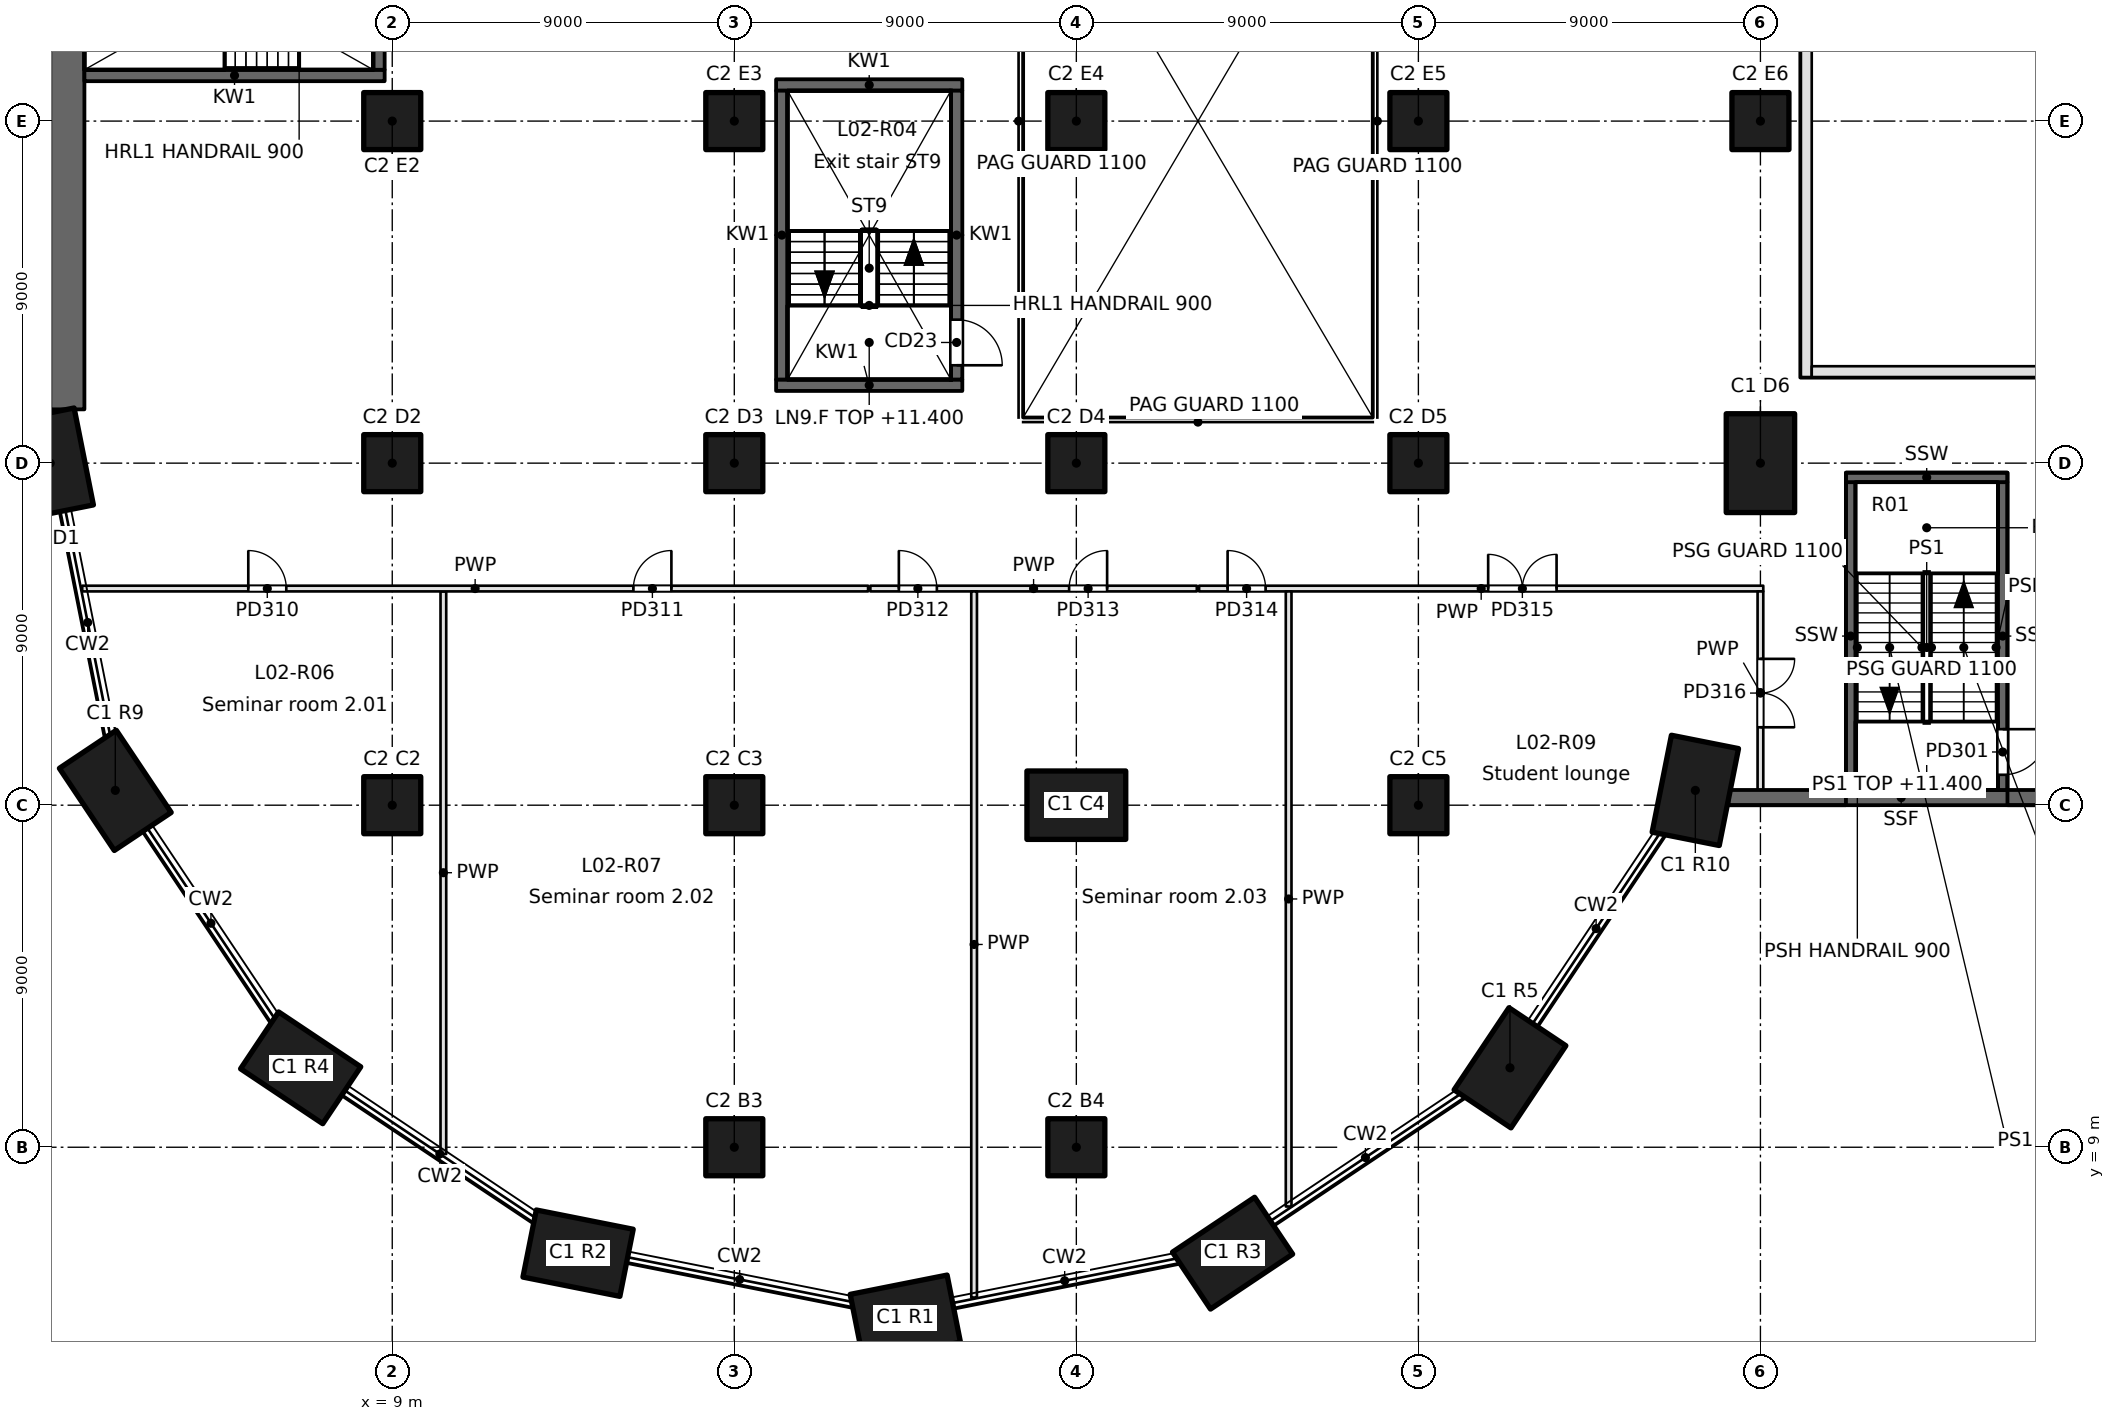
"""IFC4 building model, lengths in metres.
Left out: names, types, materials, properties, quantities, classifications, styles, units other than length and angle.
Written with IfcOpenShell. Run it as: python <this file> out.ifc"""

import sys

from ifc_helpers import new_model, si_unit, direction, frame, frame_2d, origin, origin_2d, place, context, subcontext, project, spatial, rectangle, extrude, element, fill, save


model = new_model("IFC4")
c1 = context("Model", 3, precision=1e-05, world=origin(), true_north=direction((0.0, 1.0)))
c2 = subcontext(c1, "Body", "Model", "MODEL_VIEW")
j1 = project(units=[si_unit("LENGTHUNIT", "METRE"), si_unit("PLANEANGLEUNIT", "RADIAN")], contexts=[c1])
p1 = place(None, origin())
s1 = spatial("IfcSite", under=j1, at=p1, CompositionType="ELEMENT")
p2 = place(p1, origin())
s2 = spatial("IfcBuilding", under=s1, at=p2, CompositionType="ELEMENT")
p3 = place(p2, frame((0.0, 0.0, 11.4)))
s3 = spatial("IfcBuildingStorey", under=s2, at=p3, CompositionType="ELEMENT", Elevation=11.4)
for number, where, z_axis, x_axis in (
    (1, (22.5, 4.5, 0.0), (0.0, 0.0, 1.0), (0.981, 0.195, 0.0)),
    (2, (13.89, 6.213, 0.0), (0.0, 0.0, 1.0), (-0.981, 0.195, 0.0)),
    (3, (31.11, 6.213, 0.0), (0.0, 0.0, 1.0), (0.831, 0.556, 0.0)),
    (4, (6.59, 11.09, 0.0), (0.0, 0.0, 1.0), (-0.831, 0.556, 0.0)),
    (5, (38.41, 11.09, 0.0), (0.0, 0.0, 1.0), (0.556, 0.831, 0.0)),
    (6, (1.713, 18.39, 0.0), (0.0, 0.0, 1.0), (-0.556, 0.831, 0.0)),
    (7, (43.287, 18.39, 0.0), (0.0, 0.0, 1.0), (0.195, 0.981, 0.0)),
    (8, (0.0, 27.0, 0.0), (0.0, 0.0, 1.0), (-0.195, 0.981, 0.0)),
    (9, (45.0, 27.0, 0.0), (0.0, 0.0, 1.0), (0.0, 1.0, 0.0)),
):
    element("IfcColumn", number, at=place(p3, frame(where, z_axis=z_axis, x_axis=x_axis)), inside=s3, PredefinedType="COLUMN", context=c2, shape_type="SweptSolid", body=[
        extrude(rectangle(XDim=2.6, YDim=1.8, at=origin_2d()), origin(), (0.0, 0.0, 1.0), 5.4),
    ])
for number, where, z_axis, x_axis in (
    (10, (45.0, 36.0, 0.0), (0.0, 0.0, 1.0), (1.0, 0.0, 0.0)),
    (11, (9.0, 18.0, 0.0), (0.0, 0.0, 1.0), (1.0, 0.0, 0.0)),
    (12, (9.0, 27.0, 0.0), (0.0, 0.0, 1.0), (1.0, 0.0, 0.0)),
    (13, (9.0, 36.0, 0.0), (0.0, 0.0, 1.0), (1.0, 0.0, 0.0)),
    (14, (18.0, 18.0, 0.0), (0.0, 0.0, 1.0), (1.0, 0.0, 0.0)),
    (15, (18.0, 27.0, 0.0), (0.0, 0.0, 1.0), (1.0, 0.0, 0.0)),
    (16, (18.0, 36.0, 0.0), (0.0, 0.0, 1.0), (1.0, 0.0, 0.0)),
):
    element("IfcColumn", number, at=place(p3, frame(where, z_axis=z_axis, x_axis=x_axis)), inside=s3, PredefinedType="COLUMN", context=c2, shape_type="SweptSolid", body=[
        extrude(rectangle(XDim=1.5, YDim=1.5, at=origin_2d()), origin(), (0.0, 0.0, 1.0), 5.4),
    ])
p4 = place(p3, frame((27.0, 18.0, 0.0), z_axis=(0.0, 0.0, 1.0), x_axis=(1.0, 0.0, 0.0)))
e17 = element("IfcColumn", 17, at=p4, inside=s3, PredefinedType="COLUMN", context=c2, shape_type="SweptSolid", body=[
    extrude(rectangle(XDim=2.6, YDim=1.8, at=origin_2d()), origin(), (0.0, 0.0, 1.0), 5.4),
])
for number, where, z_axis, x_axis in (
    (18, (27.0, 27.0, 0.0), (0.0, 0.0, 1.0), (1.0, 0.0, 0.0)),
    (19, (27.0, 36.0, 0.0), (0.0, 0.0, 1.0), (1.0, 0.0, 0.0)),
    (20, (36.0, 18.0, 0.0), (0.0, 0.0, 1.0), (1.0, 0.0, 0.0)),
    (21, (36.0, 27.0, 0.0), (0.0, 0.0, 1.0), (1.0, 0.0, 0.0)),
    (22, (36.0, 36.0, 0.0), (0.0, 0.0, 1.0), (1.0, 0.0, 0.0)),
    (23, (18.0, 9.0, 0.0), (0.0, 0.0, 1.0), (1.0, 0.0, 0.0)),
    (24, (27.0, 9.0, 0.0), (0.0, 0.0, 1.0), (1.0, 0.0, 0.0)),
):
    element("IfcColumn", number, at=place(p3, frame(where, z_axis=z_axis, x_axis=x_axis)), inside=s3, PredefinedType="COLUMN", context=c2, shape_type="SweptSolid", body=[
        extrude(rectangle(XDim=1.5, YDim=1.5, at=origin_2d()), origin(), (0.0, 0.0, 1.0), 5.4),
    ])
p5 = place(p3, frame((0.45, 94.5, 0.0), z_axis=(0.0, 0.0, 1.0), x_axis=(0.0, -1.0, 0.0)))
e25 = element("IfcWall", 25, at=p5, inside=s3, PredefinedType="SHEAR", context=c2, shape_type="SweptSolid", body=[
    extrude(rectangle(XDim=66.085, YDim=0.9, at=frame_2d((33.042, 0.0))), origin(), (0.0, 0.0, 1.0), 5.4),
])
for number, where, z_axis, x_axis in (
    (26, (19.1, 29.05, -0.35), (0.0, 0.0, 1.0), (1.0, 0.0, 0.0)),
    (27, (19.1, 36.95, -0.35), (0.0, 0.0, 1.0), (1.0, 0.0, 0.0)),
):
    element("IfcWall", number, at=place(p3, frame(where, z_axis=z_axis, x_axis=x_axis)), inside=s3, PredefinedType="SOLIDWALL", context=c2, shape_type="SweptSolid", body=[
        extrude(rectangle(XDim=4.9, YDim=0.3, at=frame_2d((2.45, 0.0))), origin(), (0.0, 0.0, 1.0), 5.4),
    ])
p6 = place(p3, frame((0.9, 37.2, -0.35), z_axis=(0.0, 0.0, 1.0), x_axis=(1.0, 0.0, 0.0)))
e28 = element("IfcWall", 28, at=p6, inside=s3, PredefinedType="SOLIDWALL", context=c2, shape_type="SweptSolid", body=[
    extrude(rectangle(XDim=7.9, YDim=0.3, at=frame_2d((3.95, 0.0))), origin(), (0.0, 0.0, 1.0), 5.4),
])
p7 = place(p3, frame((8.65, 37.35, -0.35), z_axis=(0.0, 0.0, 1.0), x_axis=(0.0, 1.0, 0.0)))
e29 = element("IfcWall", 29, at=p7, inside=s3, PredefinedType="SOLIDWALL", context=c2, shape_type="SweptSolid", body=[
    extrude(rectangle(XDim=4.3, YDim=0.3, at=frame_2d((2.15, 0.0))), origin(), (0.0, 0.0, 1.0), 5.4),
])
p8 = place(p3, frame((19.25, 29.2, -0.35), z_axis=(0.0, 0.0, 1.0), x_axis=(0.0, 1.0, 0.0)))
e30 = element("IfcWall", 30, at=p8, inside=s3, PredefinedType="SOLIDWALL", context=c2, shape_type="SweptSolid", body=[
    extrude(rectangle(XDim=7.6, YDim=0.3, at=frame_2d((3.8, 0.0))), origin(), (0.0, 0.0, 1.0), 5.4),
])
p9 = place(p3, frame((23.85, 29.2, -0.35), z_axis=(0.0, 0.0, 1.0), x_axis=(0.0, 1.0, 0.0)))
e31 = element("IfcWall", 31, at=p9, inside=s3, PredefinedType="SOLIDWALL", context=c2, shape_type="SweptSolid", body=[
    extrude(rectangle(XDim=7.6, YDim=0.3, at=frame_2d((3.8, 0.0))), origin(), (0.0, 0.0, 1.0), 5.4),
])
p10 = place(p9, frame((0.375, 0.0, 0.35)))
e32 = element("IfcOpeningElement", 32, at=p10, cuts=e31, PredefinedType="OPENING", context=c2, shape_type="SweptSolid", body=[
    extrude(rectangle(XDim=1.2, YDim=2.1, at=frame_2d((0.6, 1.05))), frame((0.0, 0.15, 0.0), z_axis=(0.0, -1.0, 0.0), x_axis=(1.0, 0.0, 0.0)), (0.0, 0.0, 1.0), 0.3),
])
p11 = place(p3, frame((47.375, 18.4, 0.0), z_axis=(0.0, 0.0, 1.0), x_axis=(0.0, 1.0, 0.0)))
e33 = element("IfcWall", 33, at=p11, inside=s3, PredefinedType="SOLIDWALL", context=c2, shape_type="SweptSolid", body=[
    extrude(rectangle(XDim=8.1, YDim=0.25, at=frame_2d((4.05, 0.0))), origin(), (0.0, 0.0, 1.0), 5.4),
])
p12 = place(p3, frame((51.375, 26.5, 0.0), z_axis=(0.0, 0.0, 1.0), x_axis=(0.0, -1.0, 0.0)))
e34 = element("IfcWall", 34, at=p12, inside=s3, PredefinedType="SOLIDWALL", context=c2, shape_type="SweptSolid", body=[
    extrude(rectangle(XDim=8.1, YDim=0.25, at=frame_2d((4.05, 0.0))), origin(), (0.0, 0.0, 1.0), 5.4),
])
p13 = place(p12, frame((6.5, 0.0, 0.0)))
e35 = element("IfcOpeningElement", 35, at=p13, cuts=e34, PredefinedType="OPENING", context=c2, shape_type="SweptSolid", body=[
    extrude(rectangle(XDim=1.2, YDim=2.1, at=frame_2d((0.6, 1.05))), frame((0.0, 0.125, 0.0), z_axis=(0.0, -1.0, 0.0), x_axis=(1.0, 0.0, 0.0)), (0.0, 0.0, 1.0), 0.25),
])
p14 = place(p3, frame((47.25, 26.625, 0.0), z_axis=(0.0, 0.0, 1.0), x_axis=(1.0, 0.0, 0.0)))
e36 = element("IfcWall", 36, at=p14, inside=s3, PredefinedType="SOLIDWALL", context=c2, shape_type="SweptSolid", body=[
    extrude(rectangle(XDim=4.25, YDim=0.25, at=frame_2d((2.125, 0.0))), origin(), (0.0, 0.0, 1.0), 5.4),
])
p15 = place(p3, frame((46.2, 29.25, 0.0), z_axis=(0.0, 0.0, 1.0), x_axis=(0.0, 1.0, 0.0)))
e37 = element("IfcWall", 37, at=p15, inside=s3, PredefinedType="SOLIDWALL", context=c2, shape_type="SweptSolid", body=[
    extrude(rectangle(XDim=23.7, YDim=0.3, at=frame_2d((11.85, 0.0))), origin(), (0.0, 0.0, 1.0), 5.05),
])
p16 = place(p3, frame((60.3, 29.4, 0.0), z_axis=(0.0, 0.0, 1.0), x_axis=(-1.0, 0.0, 0.0)))
e38 = element("IfcWall", 38, at=p16, inside=s3, PredefinedType="SOLIDWALL", context=c2, shape_type="SweptSolid", body=[
    extrude(rectangle(XDim=13.95, YDim=0.3, at=frame_2d((6.975, 0.0))), origin(), (0.0, 0.0, 1.0), 5.05),
])
p17 = place(p3, frame((53.25, 18.2, 0.0), z_axis=(0.0, 0.0, 1.0), x_axis=(-1.0, 0.0, 0.0)))
e39 = element("IfcWall", 39, at=p17, inside=s3, PredefinedType="SOLIDWALL", context=c2, shape_type="SweptSolid", body=[
    extrude(rectangle(XDim=9.093, YDim=0.4, at=frame_2d((4.546, 0.0))), origin(), (0.0, 0.0, 1.0), 5.05),
])
p18 = place(p3, frame((10.345, 8.822, 0.0), z_axis=(0.0, 0.0, 1.0), x_axis=(0.0, 1.0, 0.0)))
e40 = element("IfcWall", 40, at=p18, inside=s3, PredefinedType="PARTITIONING", context=c2, shape_type="SweptSolid", body=[
    extrude(rectangle(XDim=14.803, YDim=0.15, at=frame_2d((7.401, 0.0))), origin(), (0.0, 0.0, 1.0), 5.05),
])
p19 = place(p3, frame((0.842, 23.7, 0.0), z_axis=(0.0, 0.0, 1.0), x_axis=(1.0, 0.0, 0.0)))
e41 = element("IfcWall", 41, at=p19, inside=s3, PredefinedType="PARTITIONING", context=c2, shape_type="SweptSolid", body=[
    extrude(rectangle(XDim=20.678, YDim=0.15, at=frame_2d((10.339, 0.0))), origin(), (0.0, 0.0, 1.0), 5.05),
])
p20 = place(p19, frame((4.37, 0.0, 0.0)))
e42 = element("IfcOpeningElement", 42, at=p20, cuts=e41, PredefinedType="OPENING", context=c2, shape_type="SweptSolid", body=[
    extrude(rectangle(XDim=1.0, YDim=2.1, at=frame_2d((0.5, 1.05))), frame((0.0, 0.075, 0.0), z_axis=(0.0, -1.0, 0.0), x_axis=(1.0, 0.0, 0.0)), (0.0, 0.0, 1.0), 0.15),
])
p21 = place(p19, frame((14.503, 0.0, 0.0)))
e43 = element("IfcOpeningElement", 43, at=p21, cuts=e41, PredefinedType="OPENING", context=c2, shape_type="SweptSolid", body=[
    extrude(rectangle(XDim=1.0, YDim=2.1, at=frame_2d((0.5, 1.05))), frame((0.0, 0.075, 0.0), z_axis=(0.0, -1.0, 0.0), x_axis=(1.0, 0.0, 0.0)), (0.0, 0.0, 1.0), 0.15),
])
p22 = place(p3, frame((21.58, 23.7, 0.0), z_axis=(0.0, 0.0, 1.0), x_axis=(1.0, 0.0, 0.0)))
e44 = element("IfcWall", 44, at=p22, inside=s3, PredefinedType="PARTITIONING", context=c2, shape_type="SweptSolid", body=[
    extrude(rectangle(XDim=8.59, YDim=0.15, at=frame_2d((4.295, 0.0))), origin(), (0.0, 0.0, 1.0), 5.05),
])
p23 = place(p22, frame((0.75, 0.0, 0.0)))
e45 = element("IfcOpeningElement", 45, at=p23, cuts=e44, PredefinedType="OPENING", context=c2, shape_type="SweptSolid", body=[
    extrude(rectangle(XDim=1.0, YDim=2.1, at=frame_2d((0.5, 1.05))), frame((0.0, 0.075, 0.0), z_axis=(0.0, -1.0, 0.0), x_axis=(1.0, 0.0, 0.0)), (0.0, 0.0, 1.0), 0.15),
])
p24 = place(p22, frame((5.23, 0.0, 0.0)))
e46 = element("IfcOpeningElement", 46, at=p24, cuts=e44, PredefinedType="OPENING", context=c2, shape_type="SweptSolid", body=[
    extrude(rectangle(XDim=1.0, YDim=2.1, at=frame_2d((0.5, 1.05))), frame((0.0, 0.075, 0.0), z_axis=(0.0, -1.0, 0.0), x_axis=(1.0, 0.0, 0.0)), (0.0, 0.0, 1.0), 0.15),
])
p25 = place(p3, frame((30.23, 23.7, 0.0), z_axis=(0.0, 0.0, 1.0), x_axis=(1.0, 0.0, 0.0)))
e47 = element("IfcWall", 47, at=p25, inside=s3, PredefinedType="PARTITIONING", context=c2, shape_type="SweptSolid", body=[
    extrude(rectangle(XDim=14.845, YDim=0.15, at=frame_2d((7.422, 0.0))), origin(), (0.0, 0.0, 1.0), 5.05),
])
p26 = place(p25, frame((0.75, 0.0, 0.0)))
e48 = element("IfcOpeningElement", 48, at=p26, cuts=e47, PredefinedType="OPENING", context=c2, shape_type="SweptSolid", body=[
    extrude(rectangle(XDim=1.0, YDim=2.1, at=frame_2d((0.5, 1.05))), frame((0.0, 0.075, 0.0), z_axis=(0.0, -1.0, 0.0), x_axis=(1.0, 0.0, 0.0)), (0.0, 0.0, 1.0), 0.15),
])
p27 = place(p25, frame((7.606, 0.0, 0.0)))
e49 = element("IfcOpeningElement", 49, at=p27, cuts=e47, PredefinedType="OPENING", context=c2, shape_type="SweptSolid", body=[
    extrude(rectangle(XDim=1.8, YDim=2.1, at=frame_2d((0.9, 1.05))), frame((0.0, 0.075, 0.0), z_axis=(0.0, -1.0, 0.0), x_axis=(1.0, 0.0, 0.0)), (0.0, 0.0, 1.0), 0.15),
])
p28 = place(p3, frame((24.31, 5.046, 0.0), z_axis=(0.0, 0.0, 1.0), x_axis=(0.0, 1.0, 0.0)))
e50 = element("IfcWall", 50, at=p28, inside=s3, PredefinedType="PARTITIONING", context=c2, shape_type="SweptSolid", body=[
    extrude(rectangle(XDim=18.579, YDim=0.15, at=frame_2d((9.29, 0.0))), origin(), (0.0, 0.0, 1.0), 5.05),
])
p29 = place(p3, frame((32.586, 7.44, 0.0), z_axis=(0.0, 0.0, 1.0), x_axis=(0.0, 1.0, 0.0)))
e51 = element("IfcWall", 51, at=p29, inside=s3, PredefinedType="PARTITIONING", context=c2, shape_type="SweptSolid", body=[
    extrude(rectangle(XDim=16.185, YDim=0.15, at=frame_2d((8.093, 0.0))), origin(), (0.0, 0.0, 1.0), 5.05),
])
p30 = place(p3, frame((45.0, 23.625, 0.0), z_axis=(0.0, 0.0, 1.0), x_axis=(0.0, -1.0, 0.0)))
e52 = element("IfcWall", 52, at=p30, inside=s3, PredefinedType="PARTITIONING", context=c2, shape_type="SweptSolid", body=[
    extrude(rectangle(XDim=5.325, YDim=0.15, at=frame_2d((2.663, 0.0))), origin(), (0.0, 0.0, 1.0), 5.05),
])
p31 = place(p30, frame((1.775, 0.0, 0.0)))
e53 = element("IfcOpeningElement", 53, at=p31, cuts=e52, PredefinedType="OPENING", context=c2, shape_type="SweptSolid", body=[
    extrude(rectangle(XDim=1.8, YDim=2.1, at=frame_2d((0.9, 1.05))), frame((0.0, 0.075, 0.0), z_axis=(0.0, -1.0, 0.0), x_axis=(1.0, 0.0, 0.0)), (0.0, 0.0, 1.0), 0.15),
])
p32 = place(p10, frame((1.2, 0.0, 0.0), z_axis=(0.0, 0.0, 1.0), x_axis=(-1.0, 0.0, 0.0)))
e54 = element("IfcDoor", 54, at=p32, inside=s3, OperationType="SINGLE_SWING_RIGHT", PredefinedType="DOOR", context=c2, shape_type="SweptSolid", body=[
    extrude(rectangle(XDim=1.2, YDim=2.1, at=frame_2d((0.6, 1.05))), frame((0.0, 0.025, 0.0), z_axis=(0.0, -1.0, 0.0), x_axis=(1.0, 0.0, 0.0)), (0.0, 0.0, 1.0), 0.05),
])
fill(e32, e54)
p33 = place(p13, origin())
e55 = element("IfcDoor", 55, at=p33, inside=s3, OperationType="SINGLE_SWING_LEFT", PredefinedType="DOOR", context=c2, shape_type="SweptSolid", body=[
    extrude(rectangle(XDim=1.2, YDim=2.1, at=frame_2d((0.6, 1.05))), frame((0.0, 0.025, 0.0), z_axis=(0.0, -1.0, 0.0), x_axis=(1.0, 0.0, 0.0)), (0.0, 0.0, 1.0), 0.05),
])
fill(e35, e55)
p34 = place(p20, origin())
e56 = element("IfcDoor", 56, at=p34, inside=s3, OperationType="SINGLE_SWING_LEFT", PredefinedType="DOOR", context=c2, shape_type="SweptSolid", body=[
    extrude(rectangle(XDim=1.0, YDim=2.1, at=frame_2d((0.5, 1.05))), frame((0.0, 0.025, 0.0), z_axis=(0.0, -1.0, 0.0), x_axis=(1.0, 0.0, 0.0)), (0.0, 0.0, 1.0), 0.05),
])
fill(e42, e56)
p35 = place(p21, origin())
e57 = element("IfcDoor", 57, at=p35, inside=s3, OperationType="SINGLE_SWING_RIGHT", PredefinedType="DOOR", context=c2, shape_type="SweptSolid", body=[
    extrude(rectangle(XDim=1.0, YDim=2.1, at=frame_2d((0.5, 1.05))), frame((0.0, 0.025, 0.0), z_axis=(0.0, -1.0, 0.0), x_axis=(1.0, 0.0, 0.0)), (0.0, 0.0, 1.0), 0.05),
])
fill(e43, e57)
p36 = place(p23, origin())
e58 = element("IfcDoor", 58, at=p36, inside=s3, OperationType="SINGLE_SWING_LEFT", PredefinedType="DOOR", context=c2, shape_type="SweptSolid", body=[
    extrude(rectangle(XDim=1.0, YDim=2.1, at=frame_2d((0.5, 1.05))), frame((0.0, 0.025, 0.0), z_axis=(0.0, -1.0, 0.0), x_axis=(1.0, 0.0, 0.0)), (0.0, 0.0, 1.0), 0.05),
])
fill(e45, e58)
p37 = place(p24, origin())
e59 = element("IfcDoor", 59, at=p37, inside=s3, OperationType="SINGLE_SWING_RIGHT", PredefinedType="DOOR", context=c2, shape_type="SweptSolid", body=[
    extrude(rectangle(XDim=1.0, YDim=2.1, at=frame_2d((0.5, 1.05))), frame((0.0, 0.025, 0.0), z_axis=(0.0, -1.0, 0.0), x_axis=(1.0, 0.0, 0.0)), (0.0, 0.0, 1.0), 0.05),
])
fill(e46, e59)
p38 = place(p26, origin())
e60 = element("IfcDoor", 60, at=p38, inside=s3, OperationType="SINGLE_SWING_LEFT", PredefinedType="DOOR", context=c2, shape_type="SweptSolid", body=[
    extrude(rectangle(XDim=1.0, YDim=2.1, at=frame_2d((0.5, 1.05))), frame((0.0, 0.025, 0.0), z_axis=(0.0, -1.0, 0.0), x_axis=(1.0, 0.0, 0.0)), (0.0, 0.0, 1.0), 0.05),
])
fill(e48, e60)
p39 = place(p27, origin())
e61 = element("IfcDoor", 61, at=p39, inside=s3, OperationType="DOUBLE_DOOR_SINGLE_SWING", PredefinedType="DOOR", context=c2, shape_type="SweptSolid", body=[
    extrude(rectangle(XDim=1.8, YDim=2.1, at=frame_2d((0.9, 1.05))), frame((0.0, 0.025, 0.0), z_axis=(0.0, -1.0, 0.0), x_axis=(1.0, 0.0, 0.0)), (0.0, 0.0, 1.0), 0.05),
])
fill(e49, e61)
p40 = place(p31, origin())
e62 = element("IfcDoor", 62, at=p40, inside=s3, OperationType="DOUBLE_DOOR_SINGLE_SWING", PredefinedType="DOOR", context=c2, shape_type="SweptSolid", body=[
    extrude(rectangle(XDim=1.8, YDim=2.1, at=frame_2d((0.9, 1.05))), frame((0.0, 0.025, 0.0), z_axis=(0.0, -1.0, 0.0), x_axis=(1.0, 0.0, 0.0)), (0.0, 0.0, 1.0), 0.05),
])
fill(e53, e62)
save(model, sys.argv[1])
